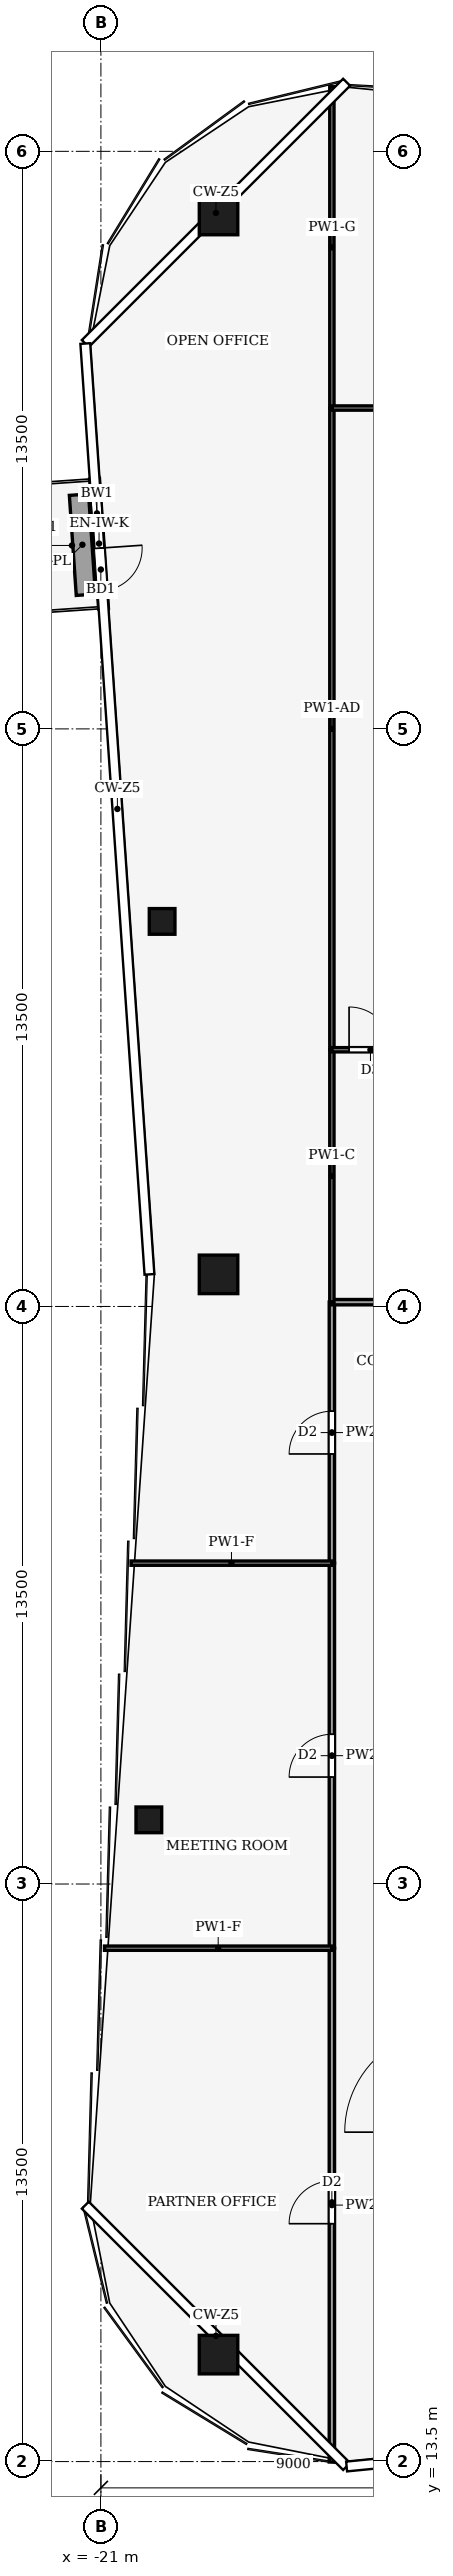
"""IFC4 building model, lengths in metres.
Left out: names, types, materials, properties, quantities, classifications, styles, units other than length and angle.
Written with IfcOpenShell. Run it as: python <this file> out.ifc"""

import sys

from ifc_helpers import new_model, si_unit, direction, frame, frame_2d, origin, origin_2d, place, context, subcontext, project, spatial, rectangle, hollow_rectangle, extrude, element, fill, save


model = new_model("IFC4")
c1 = context("Model", 3, precision=1e-05, world=origin(), true_north=direction((0.0, 1.0)))
c2 = subcontext(c1, "Body", "Model", "MODEL_VIEW")
j1 = project(units=[si_unit("LENGTHUNIT", "METRE"), si_unit("PLANEANGLEUNIT", "RADIAN")], contexts=[c1])
p1 = place(None, origin())
s1 = spatial("IfcSite", under=j1, at=p1, CompositionType="ELEMENT")
p2 = place(p1, origin())
s2 = spatial("IfcBuilding", under=s1, at=p2, CompositionType="ELEMENT")
p3 = place(p2, frame((0.0, 0.0, 314.0)))
s3 = spatial("IfcBuildingStorey", under=s2, at=p3, CompositionType="ELEMENT", Elevation=314.0)
for number, where, z_axis, x_axis in (
    (1, (-18.25, 66.0, 0.0), (0.0, 0.0, 1.0), (1.0, 0.0, 0.0)),
    (2, (-18.25, 16.0, 0.0), (0.0, 0.0, 1.0), (1.0, 0.0, 0.0)),
    (3, (-18.25, 41.25, 0.0), (0.0, 0.0, 1.0), (1.0, 0.0, 0.0)),
):
    element("IfcColumn", number, at=place(p3, frame(where, z_axis=z_axis, x_axis=x_axis)), inside=s3, PredefinedType="COLUMN", context=c2, shape_type="SweptSolid", body=[
        extrude(hollow_rectangle(XDim=0.9, YDim=0.9, WallThickness=0.04, at=origin_2d()), origin(), (0.0, 0.0, 1.0), 4.0),
    ])
for number, where, z_axis, x_axis in (
    (4, (-19.879, 28.5, 0.0), (0.0, 0.0, 1.0), (1.0, 0.0, 0.0)),
    (5, (-19.569, 49.5, 0.0), (0.0, 0.0, 1.0), (1.0, 0.0, 0.0)),
):
    element("IfcColumn", number, at=place(p3, frame(where, z_axis=z_axis, x_axis=x_axis)), inside=s3, PredefinedType="COLUMN", context=c2, shape_type="SweptSolid", body=[
        extrude(hollow_rectangle(XDim=0.6, YDim=0.6, WallThickness=0.025, at=origin_2d()), origin(), (0.0, 0.0, 1.0), 4.0),
    ])
p4 = place(p3, frame((-21.148, 59.85, 0.0), z_axis=(0.0, 0.0, 1.0), x_axis=(0.068802091615, -0.997630328423, 0.0)))
e6 = element("IfcWall", 6, at=p4, inside=s3, PredefinedType="SOLIDWALL", context=c2, shape_type="SweptSolid", body=[
    extrude(rectangle(XDim=3.045, YDim=0.23, at=frame_2d((1.522, 0.0))), origin(), (0.0, 0.0, 1.0), 3.65),
])
p5 = place(p4, frame((1.63, 0.0, 0.0)))
e7 = element("IfcOpeningElement", 7, at=p5, cuts=e6, PredefinedType="OPENING", context=c2, shape_type="SweptSolid", body=[
    extrude(rectangle(XDim=1.0, YDim=2.1, at=frame_2d((0.5, 1.05))), frame((0.0, 0.125, 0.0), z_axis=(0.0, -1.0, 0.0), x_axis=(1.0, 0.0, 0.0)), (0.0, 0.0, 1.0), 0.25),
])
p6 = place(p4, frame((0.415, 0.0, 0.9)))
e8 = element("IfcOpeningElement", 8, at=p6, cuts=e6, PredefinedType="OPENING", context=c2, shape_type="SweptSolid", body=[
    extrude(rectangle(XDim=0.8, YDim=1.2, at=frame_2d((0.4, 0.6))), frame((0.0, 0.125, 0.0), z_axis=(0.0, -1.0, 0.0), x_axis=(1.0, 0.0, 0.0)), (0.0, 0.0, 1.0), 0.25),
])
p7 = place(p3, frame((-21.513, 59.474, 0.0), z_axis=(0.0, 0.0, 1.0), x_axis=(0.068723472833, -0.997635747295, 0.0)))
e9 = element("IfcWall", 9, at=p7, inside=s3, PredefinedType="USERDEFINED", context=c2, shape_type="SweptSolid", body=[
    extrude(rectangle(XDim=2.345, YDim=0.45, at=frame_2d((1.172, 0.0))), origin(), (0.0, 0.0, 1.0), 0.4),
])
p8 = place(p3, frame((-15.6, 13.49, 0.0), z_axis=(0.0, 0.0, 1.0), x_axis=(0.0, 1.0, 0.0)))
e10 = element("IfcWall", 10, at=p8, inside=s3, PredefinedType="PARTITIONING", context=c2, shape_type="SweptSolid", body=[
    extrude(rectangle(XDim=12.01, YDim=0.125, at=frame_2d((6.005, 0.0))), origin(), (0.0, 0.0, 1.0), 2.93),
])
p9 = place(p8, frame((5.571, 0.0, 0.0)))
e11 = element("IfcOpeningElement", 11, at=p9, cuts=e10, PredefinedType="OPENING", context=c2, shape_type="SweptSolid", body=[
    extrude(rectangle(XDim=1.0, YDim=2.1, at=frame_2d((0.5, 1.05))), frame((0.0, 0.073, 0.0), z_axis=(0.0, -1.0, 0.0), x_axis=(1.0, 0.0, 0.0)), (0.0, 0.0, 1.0), 0.145),
])
p10 = place(p3, frame((-15.6, 25.5, 0.0), z_axis=(0.0, 0.0, 1.0), x_axis=(0.0, 1.0, 0.0)))
e12 = element("IfcWall", 12, at=p10, inside=s3, PredefinedType="PARTITIONING", context=c2, shape_type="SweptSolid", body=[
    extrude(rectangle(XDim=9.0, YDim=0.125, at=frame_2d((4.5, 0.0))), origin(), (0.0, 0.0, 1.0), 3.54),
])
p11 = place(p10, frame((4.0, 0.0, 0.0)))
e13 = element("IfcOpeningElement", 13, at=p11, cuts=e12, PredefinedType="OPENING", context=c2, shape_type="SweptSolid", body=[
    extrude(rectangle(XDim=1.0, YDim=2.1, at=frame_2d((0.5, 1.05))), frame((0.0, 0.073, 0.0), z_axis=(0.0, -1.0, 0.0), x_axis=(1.0, 0.0, 0.0)), (0.0, 0.0, 1.0), 0.145),
])
p12 = place(p3, frame((-15.6, 34.5, 0.0), z_axis=(0.0, 0.0, 1.0), x_axis=(0.0, 1.0, 0.0)))
e14 = element("IfcWall", 14, at=p12, inside=s3, PredefinedType="PARTITIONING", context=c2, shape_type="SweptSolid", body=[
    extrude(rectangle(XDim=6.104, YDim=0.125, at=frame_2d((3.052, 0.0))), origin(), (0.0, 0.0, 1.0), 3.14),
])
p13 = place(p12, frame((2.552, 0.0, 0.0)))
e15 = element("IfcOpeningElement", 15, at=p13, cuts=e14, PredefinedType="OPENING", context=c2, shape_type="SweptSolid", body=[
    extrude(rectangle(XDim=1.0, YDim=2.1, at=frame_2d((0.5, 1.05))), frame((0.0, 0.073, 0.0), z_axis=(0.0, -1.0, 0.0), x_axis=(1.0, 0.0, 0.0)), (0.0, 0.0, 1.0), 0.145),
])
p14 = place(p3, frame((-15.6, 40.6, 0.0), z_axis=(0.0, 0.0, 1.0), x_axis=(1.0, 0.0, 0.0)))
e16 = element("IfcWall", 16, at=p14, inside=s3, PredefinedType="PARTITIONING", context=c2, shape_type="SweptSolid", body=[
    extrude(rectangle(XDim=6.6, YDim=0.125, at=frame_2d((3.3, 0.0))), origin(), (0.0, 0.0, 1.0), 3.39),
])
p15 = place(p14, frame((2.8, 0.0, 0.0)))
e17 = element("IfcOpeningElement", 17, at=p15, cuts=e16, PredefinedType="OPENING", context=c2, shape_type="SweptSolid", body=[
    extrude(rectangle(XDim=1.0, YDim=2.1, at=frame_2d((0.5, 1.05))), frame((0.0, 0.073, 0.0), z_axis=(0.0, -1.0, 0.0), x_axis=(1.0, 0.0, 0.0)), (0.0, 0.0, 1.0), 0.145),
])
p16 = place(p3, frame((-15.6, 25.5, 0.0), z_axis=(0.0, 0.0, 1.0), x_axis=(-1.0, 0.0, 0.0)))
e18 = element("IfcWall", 18, at=p16, inside=s3, PredefinedType="PARTITIONING", context=c2, shape_type="SweptSolid", body=[
    extrude(rectangle(XDim=5.316, YDim=0.1, at=frame_2d((2.658, 0.0))), origin(), (0.0, 0.0, 1.0), 3.04),
])
p17 = place(p3, frame((-15.6, 34.5, 0.0), z_axis=(0.0, 0.0, 1.0), x_axis=(-1.0, 0.0, 0.0)))
e19 = element("IfcWall", 19, at=p17, inside=s3, PredefinedType="PARTITIONING", context=c2, shape_type="SweptSolid", body=[
    extrude(rectangle(XDim=4.695, YDim=0.1, at=frame_2d((2.348, 0.0))), origin(), (0.0, 0.0, 1.0), 3.04),
])
p18 = place(p3, frame((-15.6, 40.6, 0.0), z_axis=(0.0, 0.0, 1.0), x_axis=(0.0, 1.0, 0.0)))
e20 = element("IfcWall", 20, at=p18, inside=s3, PredefinedType="PARTITIONING", context=c2, shape_type="SweptSolid", body=[
    extrude(rectangle(XDim=5.9, YDim=0.1, at=frame_2d((2.95, 0.0))), origin(), (0.0, 0.0, 1.0), 3.87),
])
p19 = place(p3, frame((-15.6, 46.5, 0.0), z_axis=(0.0, 0.0, 1.0), x_axis=(0.0, 1.0, 0.0)))
e21 = element("IfcWall", 21, at=p19, inside=s3, PredefinedType="PARTITIONING", context=c2, shape_type="SweptSolid", body=[
    extrude(rectangle(XDim=15.0, YDim=0.1, at=frame_2d((7.5, 0.0))), origin(), (0.0, 0.0, 1.0), 3.35),
])
p20 = place(p3, frame((-15.6, 61.5, 0.0), z_axis=(0.0, 0.0, 1.0), x_axis=(0.0, 1.0, 0.0)))
e22 = element("IfcWall", 22, at=p20, inside=s3, PredefinedType="PARTITIONING", context=c2, shape_type="SweptSolid", body=[
    extrude(rectangle(XDim=7.51, YDim=0.1, at=frame_2d((3.755, 0.0))), origin(), (0.0, 0.0, 1.0), 2.93),
])
p21 = place(p3, frame((-15.6, 46.5, 0.0), z_axis=(0.0, 0.0, 1.0), x_axis=(1.0, 0.0, 0.0)))
e23 = element("IfcWall", 23, at=p21, inside=s3, PredefinedType="PARTITIONING", context=c2, shape_type="SweptSolid", body=[
    extrude(rectangle(XDim=6.604, YDim=0.1, at=frame_2d((3.302, 0.0))), origin(), (0.0, 0.0, 1.0), 3.39),
])
p22 = place(p21, frame((0.402, 0.0, 0.0)))
e24 = element("IfcOpeningElement", 24, at=p22, cuts=e23, PredefinedType="OPENING", context=c2, shape_type="SweptSolid", body=[
    extrude(rectangle(XDim=1.0, YDim=2.1, at=frame_2d((0.5, 1.05))), frame((0.0, 0.06, 0.0), z_axis=(0.0, -1.0, 0.0), x_axis=(1.0, 0.0, 0.0)), (0.0, 0.0, 1.0), 0.12),
])
p23 = place(p3, frame((-15.6, 61.5, 0.0), z_axis=(0.0, 0.0, 1.0), x_axis=(1.0, 0.0, 0.0)))
e25 = element("IfcWall", 25, at=p23, inside=s3, PredefinedType="PARTITIONING", context=c2, shape_type="SweptSolid", body=[
    extrude(rectangle(XDim=9.6, YDim=0.1, at=frame_2d((4.8, 0.0))), origin(), (0.0, 0.0, 1.0), 3.24),
])
p24 = place(p23, frame((4.3, 0.0, 0.0)))
e26 = element("IfcOpeningElement", 26, at=p24, cuts=e25, PredefinedType="OPENING", context=c2, shape_type="SweptSolid", body=[
    extrude(rectangle(XDim=1.0, YDim=2.1, at=frame_2d((0.5, 1.05))), frame((0.0, 0.06, 0.0), z_axis=(0.0, -1.0, 0.0), x_axis=(1.0, 0.0, 0.0)), (0.0, 0.0, 1.0), 0.12),
])
p25 = place(p5, origin())
e27 = element("IfcDoor", 27, at=p25, inside=s3, OperationType="SINGLE_SWING_RIGHT", PredefinedType="DOOR", context=c2, shape_type="SweptSolid", body=[
    extrude(rectangle(XDim=1.0, YDim=2.1, at=frame_2d((0.5, 1.05))), frame((0.0, 0.025, 0.0), z_axis=(0.0, -1.0, 0.0), x_axis=(1.0, 0.0, 0.0)), (0.0, 0.0, 1.0), 0.05),
])
fill(e7, e27)
p26 = place(p6, origin())
e28 = element("IfcWindow", 28, at=p26, inside=s3, PartitioningType="SINGLE_PANEL", PredefinedType="WINDOW", context=c2, shape_type="SweptSolid", body=[
    extrude(rectangle(XDim=0.8, YDim=1.2, at=frame_2d((0.4, 0.6))), frame((0.0, 0.03, 0.0), z_axis=(0.0, -1.0, 0.0), x_axis=(1.0, 0.0, 0.0)), (0.0, 0.0, 1.0), 0.06),
])
fill(e8, e28)
p27 = place(p9, origin())
e29 = element("IfcDoor", 29, at=p27, inside=s3, OperationType="SINGLE_SWING_RIGHT", PredefinedType="DOOR", context=c2, shape_type="SweptSolid", body=[
    extrude(rectangle(XDim=1.0, YDim=2.1, at=frame_2d((0.5, 1.05))), frame((0.0, 0.025, 0.0), z_axis=(0.0, -1.0, 0.0), x_axis=(1.0, 0.0, 0.0)), (0.0, 0.0, 1.0), 0.05),
])
fill(e11, e29)
p28 = place(p11, origin())
e30 = element("IfcDoor", 30, at=p28, inside=s3, OperationType="SINGLE_SWING_RIGHT", PredefinedType="DOOR", context=c2, shape_type="SweptSolid", body=[
    extrude(rectangle(XDim=1.0, YDim=2.1, at=frame_2d((0.5, 1.05))), frame((0.0, 0.025, 0.0), z_axis=(0.0, -1.0, 0.0), x_axis=(1.0, 0.0, 0.0)), (0.0, 0.0, 1.0), 0.05),
])
fill(e13, e30)
p29 = place(p13, origin())
e31 = element("IfcDoor", 31, at=p29, inside=s3, OperationType="SINGLE_SWING_LEFT", PredefinedType="DOOR", context=c2, shape_type="SweptSolid", body=[
    extrude(rectangle(XDim=1.0, YDim=2.1, at=frame_2d((0.5, 1.05))), frame((0.0, 0.025, 0.0), z_axis=(0.0, -1.0, 0.0), x_axis=(1.0, 0.0, 0.0)), (0.0, 0.0, 1.0), 0.05),
])
fill(e15, e31)
p30 = place(p22, origin())
e32 = element("IfcDoor", 32, at=p30, inside=s3, OperationType="SINGLE_SWING_LEFT", PredefinedType="DOOR", context=c2, shape_type="SweptSolid", body=[
    extrude(rectangle(XDim=1.0, YDim=2.1, at=frame_2d((0.5, 1.05))), frame((0.0, 0.025, 0.0), z_axis=(0.0, -1.0, 0.0), x_axis=(1.0, 0.0, 0.0)), (0.0, 0.0, 1.0), 0.05),
])
fill(e24, e32)
save(model, sys.argv[1])
